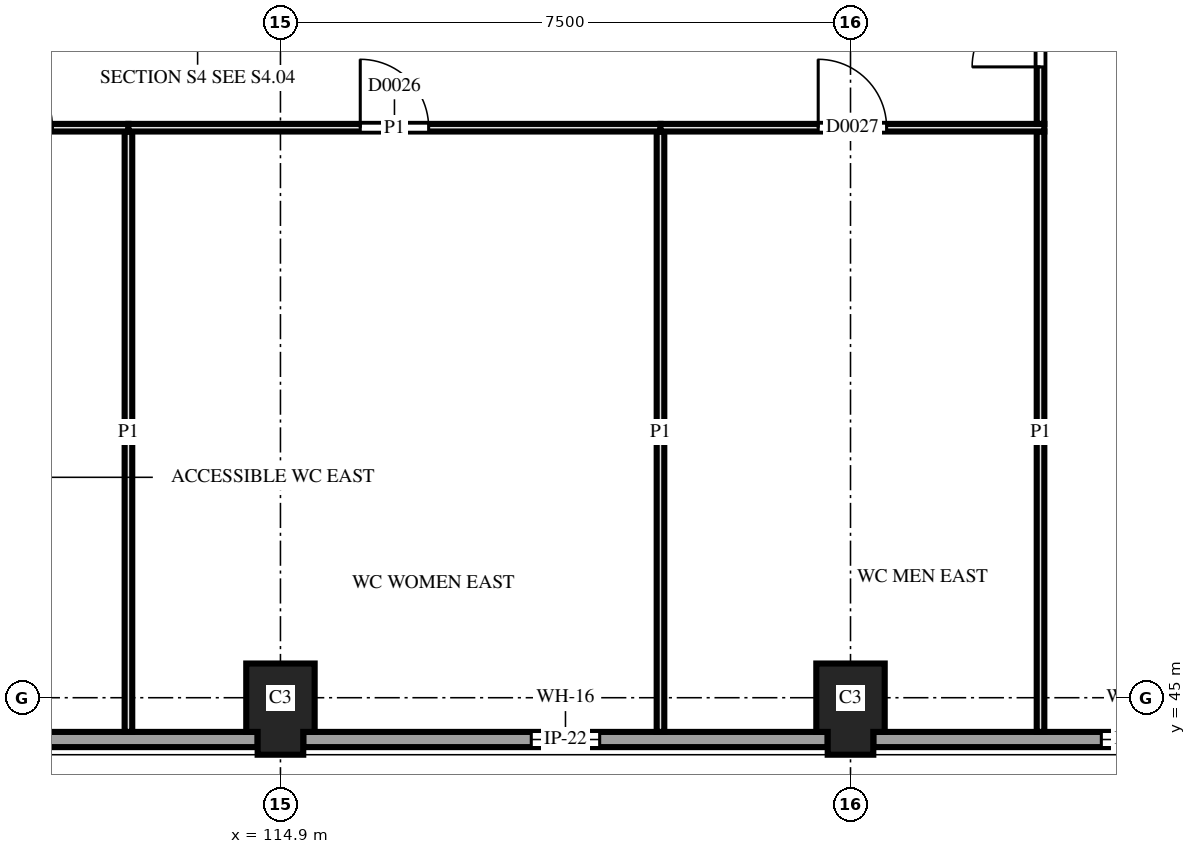
"""IFC4 building model, lengths in metres.
Left out: names, types, materials, properties, quantities, classifications, styles, units other than length and angle.
Written with IfcOpenShell. Run it as: python <this file> out.ifc"""

import sys

from ifc_helpers import new_model, si_unit, direction, frame, frame_2d, origin, place, context, subcontext, project, spatial, polyline, rectangle, outline, extrude, element, fill, save


model = new_model("IFC4")
c1 = context("Model", 3, precision=1e-05, world=origin(), true_north=direction((0.0, 1.0)))
c2 = subcontext(c1, "Body", "Model", "MODEL_VIEW")
j1 = project(units=[si_unit("LENGTHUNIT", "METRE"), si_unit("PLANEANGLEUNIT", "RADIAN")], contexts=[c1])
p1 = place(None, origin())
s1 = spatial("IfcSite", under=j1, at=p1, CompositionType="ELEMENT")
p2 = place(p1, origin())
s2 = spatial("IfcBuilding", under=s1, at=p2, CompositionType="ELEMENT")
p3 = place(p2, origin())
s3 = spatial("IfcBuildingStorey", under=s2, at=p3, CompositionType="ELEMENT", Elevation=0.0)
for number, where, z_axis, x_axis in (
    (1, (114.9, 45.0, 0.0), (0.0, 0.0, 1.0), (0.0, -1.0, 0.0)),
    (2, (122.4, 45.0, 0.0), (0.0, 0.0, 1.0), (0.0, -1.0, 0.0)),
):
    element("IfcColumn", number, at=place(p3, frame(where, z_axis=z_axis, x_axis=x_axis)), inside=s3, PredefinedType="COLUMN", context=c2, shape_type="SweptSolid", body=[
        extrude(outline(polyline([(-0.45, -0.45), (0.45, -0.45), (0.45, -0.3), (0.75, -0.3), (0.75, 0.3), (0.45, 0.3), (0.45, 0.45), (-0.45, 0.45), (-0.45, -0.45)])), origin(), (0.0, 0.0, 1.0), 4.5),
    ])
p4 = place(p3, frame((107.7, 44.45, 0.0), z_axis=(0.0, 0.0, 1.0), x_axis=(1.0, 0.0, 0.0)))
e3 = element("IfcWall", 3, at=p4, inside=s3, PredefinedType="SOLIDWALL", context=c2, shape_type="SweptSolid", body=[
    extrude(outline(polyline([(0.0, 0.0), (6.9, 0.0), (6.9, 3.1), (6.002, 3.1), (6.0, 2.4), (5.681, 2.56), (5.363, 2.695), (5.044, 2.806), (4.725, 2.895), (4.406, 2.963), (4.087, 3.012), (3.769, 3.041), (3.45, 3.05), (3.131, 3.041), (2.812, 3.012), (2.494, 2.963), (2.175, 2.895), (1.856, 2.806), (1.538, 2.695), (1.219, 2.56), (0.9, 2.4), (0.898, 3.1), (0.0, 3.1), (0.0, 0.0)])), frame((0.0, 0.1, 0.0), z_axis=(0.0, -1.0, 0.0), x_axis=(1.0, 0.0, 0.0)), (0.0, 0.0, 1.0), 0.2),
])
p5 = place(p4, frame((3.0, 0.0, 2.4)))
e4 = element("IfcOpeningElement", 4, at=p5, cuts=e3, PredefinedType="OPENING", context=c2, shape_type="SweptSolid", body=[
    extrude(rectangle(XDim=0.9, YDim=0.531, at=frame_2d((0.45, 0.266))), frame((0.0, 0.11, 0.0), z_axis=(0.0, -1.0, 0.0), x_axis=(1.0, 0.0, 0.0)), (0.0, 0.0, 1.0), 0.22),
])
p6 = place(p3, frame((115.2, 44.45, 0.0), z_axis=(0.0, 0.0, 1.0), x_axis=(1.0, 0.0, 0.0)))
e5 = element("IfcWall", 5, at=p6, inside=s3, PredefinedType="SOLIDWALL", context=c2, shape_type="SweptSolid", body=[
    extrude(outline(polyline([(0.0, 0.0), (6.9, 0.0), (6.9, 3.1), (6.002, 3.1), (6.0, 2.4), (5.681, 2.56), (5.363, 2.695), (5.044, 2.806), (4.725, 2.895), (4.406, 2.963), (4.087, 3.012), (3.769, 3.041), (3.45, 3.05), (3.131, 3.041), (2.812, 3.012), (2.494, 2.963), (2.175, 2.895), (1.856, 2.806), (1.538, 2.695), (1.219, 2.56), (0.9, 2.4), (0.898, 3.1), (0.0, 3.1), (0.0, 0.0)])), frame((0.0, 0.1, 0.0), z_axis=(0.0, -1.0, 0.0), x_axis=(1.0, 0.0, 0.0)), (0.0, 0.0, 1.0), 0.2),
])
p7 = place(p6, frame((3.0, 0.0, 2.4)))
e6 = element("IfcOpeningElement", 6, at=p7, cuts=e5, PredefinedType="OPENING", context=c2, shape_type="SweptSolid", body=[
    extrude(rectangle(XDim=0.9, YDim=0.531, at=frame_2d((0.45, 0.266))), frame((0.0, 0.11, 0.0), z_axis=(0.0, -1.0, 0.0), x_axis=(1.0, 0.0, 0.0)), (0.0, 0.0, 1.0), 0.22),
])
p8 = place(p3, frame((122.7, 44.45, 0.0), z_axis=(0.0, 0.0, 1.0), x_axis=(1.0, 0.0, 0.0)))
e7 = element("IfcWall", 7, at=p8, inside=s3, PredefinedType="SOLIDWALL", context=c2, shape_type="SweptSolid", body=[
    extrude(outline(polyline([(0.0, 0.0), (6.9, 0.0), (6.9, 3.1), (6.002, 3.1), (6.0, 2.4), (5.681, 2.56), (5.363, 2.695), (5.044, 2.806), (4.725, 2.895), (4.406, 2.963), (4.087, 3.012), (3.769, 3.041), (3.45, 3.05), (3.131, 3.041), (2.812, 3.012), (2.494, 2.963), (2.175, 2.895), (1.856, 2.806), (1.538, 2.695), (1.219, 2.56), (0.9, 2.4), (0.898, 3.1), (0.0, 3.1), (0.0, 0.0)])), frame((0.0, 0.1, 0.0), z_axis=(0.0, -1.0, 0.0), x_axis=(1.0, 0.0, 0.0)), (0.0, 0.0, 1.0), 0.2),
])
p9 = place(p8, frame((3.0, 0.0, 2.4)))
e8 = element("IfcOpeningElement", 8, at=p9, cuts=e7, PredefinedType="OPENING", context=c2, shape_type="SweptSolid", body=[
    extrude(rectangle(XDim=0.9, YDim=0.531, at=frame_2d((0.45, 0.266))), frame((0.0, 0.11, 0.0), z_axis=(0.0, -1.0, 0.0), x_axis=(1.0, 0.0, 0.0)), (0.0, 0.0, 1.0), 0.22),
])
for number, where, z_axis, x_axis in (
    (9, (112.9, 44.55, 0.0), (0.0, 0.0, 1.0), (0.0, 1.0, 0.0)),
    (10, (119.9, 44.55, 0.0), (0.0, 0.0, 1.0), (0.0, 1.0, 0.0)),
):
    element("IfcWall", number, at=place(p3, frame(where, z_axis=z_axis, x_axis=x_axis)), inside=s3, PredefinedType="PARTITIONING", context=c2, shape_type="SweptSolid", body=[
        extrude(rectangle(XDim=7.9, YDim=0.1, at=frame_2d((3.95, 0.0))), origin(), (0.0, 0.0, 1.0), 3.68),
    ])
p10 = place(p3, frame((112.9, 52.5, 0.0), z_axis=(0.0, 0.0, 1.0), x_axis=(-1.0, 0.0, 0.0)))
e11 = element("IfcWall", 11, at=p10, inside=s3, PredefinedType="PARTITIONING", context=c2, shape_type="SweptSolid", body=[
    extrude(rectangle(XDim=3.0, YDim=0.1, at=frame_2d((1.5, 0.0))), origin(), (0.0, 0.0, 1.0), 3.68),
])
p11 = place(p10, frame((1.0, 0.0, 0.0)))
e12 = element("IfcOpeningElement", 12, at=p11, cuts=e11, PredefinedType="OPENING", context=c2, shape_type="SweptSolid", body=[
    extrude(rectangle(XDim=1.0, YDim=2.1, at=frame_2d((0.5, 1.05))), frame((0.0, 0.06, 0.0), z_axis=(0.0, -1.0, 0.0), x_axis=(1.0, 0.0, 0.0)), (0.0, 0.0, 1.0), 0.12),
])
p12 = place(p3, frame((119.9, 52.5, 0.0), z_axis=(0.0, 0.0, 1.0), x_axis=(-1.0, 0.0, 0.0)))
e13 = element("IfcWall", 13, at=p12, inside=s3, PredefinedType="PARTITIONING", context=c2, shape_type="SweptSolid", body=[
    extrude(rectangle(XDim=7.0, YDim=0.1, at=frame_2d((3.5, 0.0))), origin(), (0.0, 0.0, 1.0), 3.68),
])
p13 = place(p12, frame((3.05, 0.0, 0.0)))
e14 = element("IfcOpeningElement", 14, at=p13, cuts=e13, PredefinedType="OPENING", context=c2, shape_type="SweptSolid", body=[
    extrude(rectangle(XDim=0.9, YDim=2.1, at=frame_2d((0.45, 1.05))), frame((0.0, 0.06, 0.0), z_axis=(0.0, -1.0, 0.0), x_axis=(1.0, 0.0, 0.0)), (0.0, 0.0, 1.0), 0.12),
])
p14 = place(p3, frame((124.9, 52.45, 0.0), z_axis=(0.0, 0.0, 1.0), x_axis=(0.0, -1.0, 0.0)))
e15 = element("IfcWall", 15, at=p14, inside=s3, PredefinedType="PARTITIONING", context=c2, shape_type="SweptSolid", body=[
    extrude(rectangle(XDim=7.9, YDim=0.1, at=frame_2d((3.95, 0.0))), origin(), (0.0, 0.0, 1.0), 3.68),
])
p15 = place(p3, frame((124.95, 52.5, 0.0), z_axis=(0.0, 0.0, 1.0), x_axis=(-1.0, 0.0, 0.0)))
e16 = element("IfcWall", 16, at=p15, inside=s3, PredefinedType="PARTITIONING", context=c2, shape_type="SweptSolid", body=[
    extrude(rectangle(XDim=5.05, YDim=0.1, at=frame_2d((2.525, 0.0))), origin(), (0.0, 0.0, 1.0), 3.68),
])
p16 = place(p15, frame((2.075, 0.0, 0.0)))
e17 = element("IfcOpeningElement", 17, at=p16, cuts=e16, PredefinedType="OPENING", context=c2, shape_type="SweptSolid", body=[
    extrude(rectangle(XDim=0.9, YDim=2.1, at=frame_2d((0.45, 1.05))), frame((0.0, 0.06, 0.0), z_axis=(0.0, -1.0, 0.0), x_axis=(1.0, 0.0, 0.0)), (0.0, 0.0, 1.0), 0.12),
])
p17 = place(p3, frame((124.9, 54.95, 0.0), z_axis=(0.0, 0.0, 1.0), x_axis=(0.0, -1.0, 0.0)))
e18 = element("IfcWall", 18, at=p17, inside=s3, PredefinedType="PARTITIONING", context=c2, shape_type="SweptSolid", body=[
    extrude(rectangle(XDim=2.4, YDim=0.1, at=frame_2d((1.2, 0.0))), origin(), (0.0, 0.0, 1.0), 3.68),
])
p18 = place(p17, frame((0.75, 0.0, 0.0)))
e19 = element("IfcOpeningElement", 19, at=p18, cuts=e18, PredefinedType="OPENING", context=c2, shape_type="SweptSolid", body=[
    extrude(rectangle(XDim=0.9, YDim=2.1, at=frame_2d((0.45, 1.05))), frame((0.0, 0.06, 0.0), z_axis=(0.0, -1.0, 0.0), x_axis=(1.0, 0.0, 0.0)), (0.0, 0.0, 1.0), 0.12),
])
p19 = place(p7, origin())
e20 = element("IfcWindow", 20, at=p19, inside=s3, PartitioningType="SINGLE_PANEL", PredefinedType="WINDOW", context=c2, shape_type="SweptSolid", body=[
    extrude(rectangle(XDim=0.9, YDim=0.531, at=frame_2d((0.45, 0.266))), frame((0.0, 0.03, 0.0), z_axis=(0.0, -1.0, 0.0), x_axis=(1.0, 0.0, 0.0)), (0.0, 0.0, 1.0), 0.06),
])
fill(e6, e20)
p20 = place(p9, origin())
e21 = element("IfcWindow", 21, at=p20, inside=s3, PartitioningType="SINGLE_PANEL", PredefinedType="WINDOW", context=c2, shape_type="SweptSolid", body=[
    extrude(rectangle(XDim=0.9, YDim=0.531, at=frame_2d((0.45, 0.266))), frame((0.0, 0.03, 0.0), z_axis=(0.0, -1.0, 0.0), x_axis=(1.0, 0.0, 0.0)), (0.0, 0.0, 1.0), 0.06),
])
fill(e8, e21)
p21 = place(p18, origin())
e22 = element("IfcDoor", 22, at=p21, inside=s3, OperationType="SINGLE_SWING_RIGHT", PredefinedType="DOOR", context=c2, shape_type="SweptSolid", body=[
    extrude(rectangle(XDim=0.9, YDim=2.1, at=frame_2d((0.45, 1.05))), frame((0.0, 0.025, 0.0), z_axis=(0.0, -1.0, 0.0), x_axis=(1.0, 0.0, 0.0)), (0.0, 0.0, 1.0), 0.05),
])
fill(e19, e22)
p22 = place(p13, origin())
e23 = element("IfcDoor", 23, at=p22, inside=s3, OperationType="SINGLE_SWING_RIGHT", PredefinedType="DOOR", context=c2, shape_type="SweptSolid", body=[
    extrude(rectangle(XDim=0.9, YDim=2.1, at=frame_2d((0.45, 1.05))), frame((0.0, 0.025, 0.0), z_axis=(0.0, -1.0, 0.0), x_axis=(1.0, 0.0, 0.0)), (0.0, 0.0, 1.0), 0.05),
])
fill(e14, e23)
p23 = place(p16, origin())
e24 = element("IfcDoor", 24, at=p23, inside=s3, OperationType="SINGLE_SWING_RIGHT", PredefinedType="DOOR", context=c2, shape_type="SweptSolid", body=[
    extrude(rectangle(XDim=0.9, YDim=2.1, at=frame_2d((0.45, 1.05))), frame((0.0, 0.025, 0.0), z_axis=(0.0, -1.0, 0.0), x_axis=(1.0, 0.0, 0.0)), (0.0, 0.0, 1.0), 0.05),
])
fill(e17, e24)
save(model, sys.argv[1])
